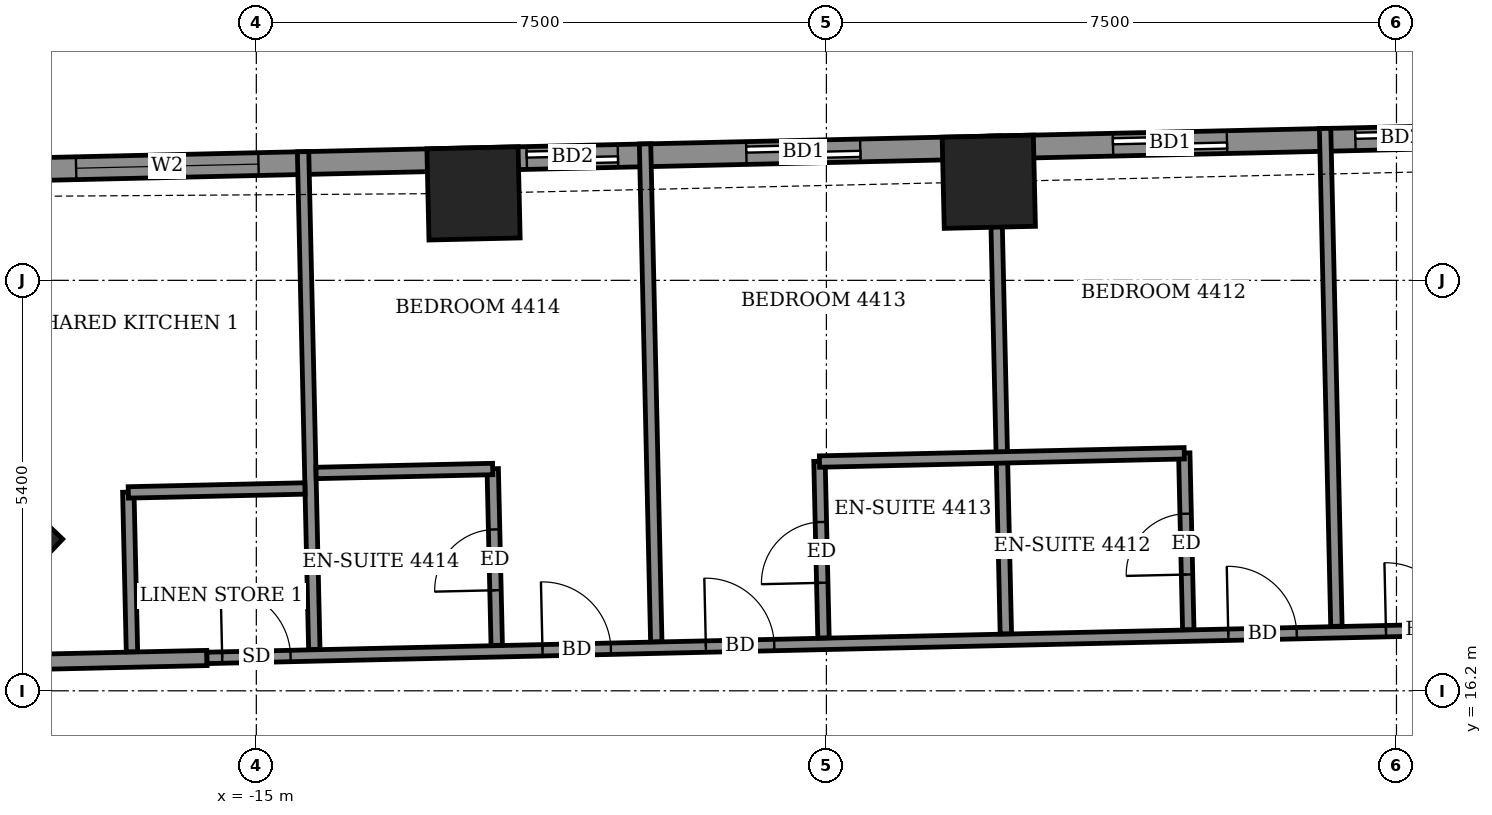
"""IFC4 building model, lengths in metres.
Left out: names, types, materials, properties, quantities, classifications, styles, units other than length and angle.
Written with IfcOpenShell. Run it as: python <this file> out.ifc"""

import sys

from ifc_helpers import new_model, si_unit, direction, frame, frame_2d, origin, origin_2d, place, context, subcontext, project, spatial, rectangle, extrude, element, fill, save


model = new_model("IFC4")
c1 = context("Model", 3, precision=1e-05, world=origin(), true_north=direction((0.0, 1.0)))
c2 = subcontext(c1, "Body", "Model", "MODEL_VIEW")
j1 = project(units=[si_unit("LENGTHUNIT", "METRE"), si_unit("PLANEANGLEUNIT", "RADIAN")], contexts=[c1])
p1 = place(None, origin())
s1 = spatial("IfcSite", under=j1, at=p1, CompositionType="ELEMENT")
p2 = place(p1, origin())
s2 = spatial("IfcBuilding", under=s1, at=p2, CompositionType="ELEMENT")
p3 = place(p2, frame((0.0, 0.0, 175.3)))
s3 = spatial("IfcBuildingStorey", under=s2, at=p3, CompositionType="ELEMENT", Elevation=175.3)
for number, where, z_axis, x_axis in (
    (1, (-5.364, 22.897, -0.55), (0.0, 0.0, 1.0), (-1.0, -0.023, 0.0)),
    (2, (-12.142, 22.744, -0.55), (0.0, 0.0, 1.0), (-1.0, -0.023, 0.0)),
    (3, (-18.396, 18.177, -0.55), (0.0, 0.0, 1.0), (-0.691, -0.723, 0.0)),
):
    element("IfcColumn", number, at=place(p3, frame(where, z_axis=z_axis, x_axis=x_axis)), inside=s3, PredefinedType="COLUMN", context=c2, shape_type="SweptSolid", body=[
        extrude(rectangle(XDim=1.2, YDim=1.2, at=origin_2d()), origin(), (0.0, 0.0, 1.0), 3.6),
    ])
p4 = place(p3, frame((21.589, 23.959, 0.0), z_axis=(0.0, 0.0, 1.0), x_axis=(-0.999742671382, -0.022684598702, 0.0)))
e4 = element("IfcWall", 4, at=p4, inside=s3, PredefinedType="SOLIDWALL", context=c2, shape_type="SweptSolid", body=[
    extrude(rectangle(XDim=40.381, YDim=0.3, at=frame_2d((20.19, 0.0))), origin(), (0.0, 0.0, 1.0), 3.05),
])
p5 = place(p4, frame((1.853, 0.0, 0.0)))
e5 = element("IfcOpeningElement", 5, at=p5, cuts=e4, PredefinedType="OPENING", context=c2, shape_type="SweptSolid", body=[
    extrude(rectangle(XDim=1.5, YDim=2.4, at=frame_2d((0.75, 1.2))), frame((0.0, 0.16, 0.0), z_axis=(0.0, -1.0, 0.0), x_axis=(1.0, 0.0, 0.0)), (0.0, 0.0, 1.0), 0.32),
])
p6 = place(p4, frame((7.38, 0.0, 0.0)))
e6 = element("IfcOpeningElement", 6, at=p6, cuts=e4, PredefinedType="OPENING", context=c2, shape_type="SweptSolid", body=[
    extrude(rectangle(XDim=1.2, YDim=2.4, at=frame_2d((0.6, 1.2))), frame((0.0, 0.16, 0.0), z_axis=(0.0, -1.0, 0.0), x_axis=(1.0, 0.0, 0.0)), (0.0, 0.0, 1.0), 0.32),
])
p7 = place(p4, frame((10.27, 0.0, 0.0)))
e7 = element("IfcOpeningElement", 7, at=p7, cuts=e4, PredefinedType="OPENING", context=c2, shape_type="SweptSolid", body=[
    extrude(rectangle(XDim=1.5, YDim=2.4, at=frame_2d((0.75, 1.2))), frame((0.0, 0.16, 0.0), z_axis=(0.0, -1.0, 0.0), x_axis=(1.0, 0.0, 0.0)), (0.0, 0.0, 1.0), 0.32),
])
p8 = place(p4, frame((15.095, 0.0, 0.0)))
e8 = element("IfcOpeningElement", 8, at=p8, cuts=e4, PredefinedType="OPENING", context=c2, shape_type="SweptSolid", body=[
    extrude(rectangle(XDim=1.5, YDim=2.4, at=frame_2d((0.75, 1.2))), frame((0.0, 0.16, 0.0), z_axis=(0.0, -1.0, 0.0), x_axis=(1.0, 0.0, 0.0)), (0.0, 0.0, 1.0), 0.32),
])
p9 = place(p4, frame((20.935, 0.0, 0.0)))
e9 = element("IfcOpeningElement", 9, at=p9, cuts=e4, PredefinedType="OPENING", context=c2, shape_type="SweptSolid", body=[
    extrude(rectangle(XDim=1.2, YDim=2.4, at=frame_2d((0.6, 1.2))), frame((0.0, 0.16, 0.0), z_axis=(0.0, -1.0, 0.0), x_axis=(1.0, 0.0, 0.0)), (0.0, 0.0, 1.0), 0.32),
])
p10 = place(p4, frame((23.825, 0.0, 0.0)))
e10 = element("IfcOpeningElement", 10, at=p10, cuts=e4, PredefinedType="OPENING", context=c2, shape_type="SweptSolid", body=[
    extrude(rectangle(XDim=1.5, YDim=2.4, at=frame_2d((0.75, 1.2))), frame((0.0, 0.16, 0.0), z_axis=(0.0, -1.0, 0.0), x_axis=(1.0, 0.0, 0.0)), (0.0, 0.0, 1.0), 0.32),
])
p11 = place(p4, frame((28.65, 0.0, 0.0)))
e11 = element("IfcOpeningElement", 11, at=p11, cuts=e4, PredefinedType="OPENING", context=c2, shape_type="SweptSolid", body=[
    extrude(rectangle(XDim=1.5, YDim=2.4, at=frame_2d((0.75, 1.2))), frame((0.0, 0.16, 0.0), z_axis=(0.0, -1.0, 0.0), x_axis=(1.0, 0.0, 0.0)), (0.0, 0.0, 1.0), 0.32),
])
p12 = place(p4, frame((31.84, 0.0, 0.0)))
e12 = element("IfcOpeningElement", 12, at=p12, cuts=e4, PredefinedType="OPENING", context=c2, shape_type="SweptSolid", body=[
    extrude(rectangle(XDim=1.2, YDim=2.4, at=frame_2d((0.6, 1.2))), frame((0.0, 0.16, 0.0), z_axis=(0.0, -1.0, 0.0), x_axis=(1.0, 0.0, 0.0)), (0.0, 0.0, 1.0), 0.32),
])
p13 = place(p4, frame((36.57, 0.0, 0.9)))
e13 = element("IfcOpeningElement", 13, at=p13, cuts=e4, PredefinedType="OPENING", context=c2, shape_type="SweptSolid", body=[
    extrude(rectangle(XDim=2.4, YDim=1.5, at=frame_2d((1.2, 0.75))), frame((0.0, 0.16, 0.0), z_axis=(0.0, -1.0, 0.0), x_axis=(1.0, 0.0, 0.0)), (0.0, 0.0, 1.0), 0.32),
])
p14 = place(p3, frame((-21.983, 16.489, 0.0), z_axis=(0.0, 0.0, 1.0), x_axis=(0.999744930163, 0.022584831499, 0.0)))
e14 = element("IfcWall", 14, at=p14, inside=s3, PredefinedType="PARTITIONING", context=c2, shape_type="SweptSolid", body=[
    extrude(rectangle(XDim=6.335, YDim=0.2, at=frame_2d((3.167, 0.0))), origin(), (0.0, 0.0, 1.0), 3.05),
])
p15 = place(p14, frame((1.475, 0.0, 0.0)))
e15 = element("IfcOpeningElement", 15, at=p15, cuts=e14, PredefinedType="OPENING", context=c2, shape_type="SweptSolid", body=[
    extrude(rectangle(XDim=1.0, YDim=2.1, at=frame_2d((0.5, 1.05))), frame((0.0, 0.11, 0.0), z_axis=(0.0, -1.0, 0.0), x_axis=(1.0, 0.0, 0.0)), (0.0, 0.0, 1.0), 0.22),
])
p16 = place(p3, frame((-15.649, 16.633, 0.0), z_axis=(0.0, 0.0, 1.0), x_axis=(0.999743261737, 0.022658565952, 0.0)))
e16 = element("IfcWall", 16, at=p16, inside=s3, PredefinedType="PARTITIONING", context=c2, shape_type="SweptSolid", body=[
    extrude(rectangle(XDim=30.536, YDim=0.15, at=frame_2d((15.268, 0.0))), origin(), (0.0, 0.0, 1.0), 3.05),
])
p17 = place(p16, frame((24.44, 0.0, 0.0)))
e17 = element("IfcOpeningElement", 17, at=p17, cuts=e16, PredefinedType="OPENING", context=c2, shape_type="SweptSolid", body=[
    extrude(rectangle(XDim=0.9, YDim=2.1, at=frame_2d((0.45, 1.05))), frame((0.0, 0.085, 0.0), z_axis=(0.0, -1.0, 0.0), x_axis=(1.0, 0.0, 0.0)), (0.0, 0.0, 1.0), 0.17),
])
p18 = place(p16, frame((22.365, 0.0, 0.0)))
e18 = element("IfcOpeningElement", 18, at=p18, cuts=e16, PredefinedType="OPENING", context=c2, shape_type="SweptSolid", body=[
    extrude(rectangle(XDim=0.9, YDim=2.1, at=frame_2d((0.45, 1.05))), frame((0.0, 0.085, 0.0), z_axis=(0.0, -1.0, 0.0), x_axis=(1.0, 0.0, 0.0)), (0.0, 0.0, 1.0), 0.17),
])
p19 = place(p16, frame((15.515, 0.0, 0.0)))
e19 = element("IfcOpeningElement", 19, at=p19, cuts=e16, PredefinedType="OPENING", context=c2, shape_type="SweptSolid", body=[
    extrude(rectangle(XDim=0.9, YDim=2.1, at=frame_2d((0.45, 1.05))), frame((0.0, 0.085, 0.0), z_axis=(0.0, -1.0, 0.0), x_axis=(1.0, 0.0, 0.0)), (0.0, 0.0, 1.0), 0.17),
])
p20 = place(p16, frame((13.44, 0.0, 0.0)))
e20 = element("IfcOpeningElement", 20, at=p20, cuts=e16, PredefinedType="OPENING", context=c2, shape_type="SweptSolid", body=[
    extrude(rectangle(XDim=0.9, YDim=2.1, at=frame_2d((0.45, 1.05))), frame((0.0, 0.085, 0.0), z_axis=(0.0, -1.0, 0.0), x_axis=(1.0, 0.0, 0.0)), (0.0, 0.0, 1.0), 0.17),
])
p21 = place(p16, frame((6.565, 0.0, 0.0)))
e21 = element("IfcOpeningElement", 21, at=p21, cuts=e16, PredefinedType="OPENING", context=c2, shape_type="SweptSolid", body=[
    extrude(rectangle(XDim=0.9, YDim=2.1, at=frame_2d((0.45, 1.05))), frame((0.0, 0.085, 0.0), z_axis=(0.0, -1.0, 0.0), x_axis=(1.0, 0.0, 0.0)), (0.0, 0.0, 1.0), 0.17),
])
p22 = place(p16, frame((4.415, 0.0, 0.0)))
e22 = element("IfcOpeningElement", 22, at=p22, cuts=e16, PredefinedType="OPENING", context=c2, shape_type="SweptSolid", body=[
    extrude(rectangle(XDim=0.9, YDim=2.1, at=frame_2d((0.45, 1.05))), frame((0.0, 0.085, 0.0), z_axis=(0.0, -1.0, 0.0), x_axis=(1.0, 0.0, 0.0)), (0.0, 0.0, 1.0), 0.17),
])
p23 = place(p16, frame((0.2, 0.0, 0.0)))
e23 = element("IfcOpeningElement", 23, at=p23, cuts=e16, PredefinedType="OPENING", context=c2, shape_type="SweptSolid", body=[
    extrude(rectangle(XDim=0.9, YDim=2.1, at=frame_2d((0.45, 1.05))), frame((0.0, 0.085, 0.0), z_axis=(0.0, -1.0, 0.0), x_axis=(1.0, 0.0, 0.0)), (0.0, 0.0, 1.0), 0.17),
])
p24 = place(p3, frame((-16.636, 16.714, 0.0), z_axis=(0.0, 0.0, 1.0), x_axis=(-0.022898307927, 0.999737799372, 0.0)))
e24 = element("IfcWall", 24, at=p24, inside=s3, PredefinedType="PARTITIONING", context=c2, shape_type="SweptSolid", body=[
    extrude(rectangle(XDim=2.1, YDim=0.15, at=frame_2d((1.05, 0.0))), origin(), (0.0, 0.0, 1.0), 3.05),
])
p25 = place(p3, frame((-14.237, 16.744, 0.0), z_axis=(0.0, 0.0, 1.0), x_axis=(-0.022585104341, 0.999744923999, 0.0)))
e25 = element("IfcWall", 25, at=p25, inside=s3, PredefinedType="PARTITIONING", context=c2, shape_type="SweptSolid", body=[
    extrude(rectangle(XDim=6.551, YDim=0.15, at=frame_2d((3.275, 0.0))), origin(), (0.0, 0.0, 1.0), 2.55),
])
p26 = place(p3, frame((-11.837, 16.798, 0.0), z_axis=(0.0, 0.0, 1.0), x_axis=(-0.02279059109, 0.999740260747, 0.0)))
e26 = element("IfcWall", 26, at=p26, inside=s3, PredefinedType="PARTITIONING", context=c2, shape_type="SweptSolid", body=[
    extrude(rectangle(XDim=2.324, YDim=0.15, at=frame_2d((1.162, 0.0))), origin(), (0.0, 0.0, 1.0), 3.05),
])
p27 = place(p26, frame((0.725, 0.0, 0.0)))
e27 = element("IfcOpeningElement", 27, at=p27, cuts=e26, PredefinedType="OPENING", context=c2, shape_type="SweptSolid", body=[
    extrude(rectangle(XDim=0.8, YDim=2.1, at=frame_2d((0.4, 1.05))), frame((0.0, 0.085, 0.0), z_axis=(0.0, -1.0, 0.0), x_axis=(1.0, 0.0, 0.0)), (0.0, 0.0, 1.0), 0.17),
])
p28 = place(p3, frame((-9.738, 16.846, 0.0), z_axis=(0.0, 0.0, 1.0), x_axis=(-0.022585104341, 0.999744923999, 0.0)))
e28 = element("IfcWall", 28, at=p28, inside=s3, PredefinedType="PARTITIONING", context=c2, shape_type="SweptSolid", body=[
    extrude(rectangle(XDim=6.551, YDim=0.15, at=frame_2d((3.275, 0.0))), origin(), (0.0, 0.0, 1.0), 2.55),
])
p29 = place(p3, frame((-7.538, 16.896, 0.0), z_axis=(0.0, 0.0, 1.0), x_axis=(-0.02279059109, 0.999740260747, 0.0)))
e29 = element("IfcWall", 29, at=p29, inside=s3, PredefinedType="PARTITIONING", context=c2, shape_type="SweptSolid", body=[
    extrude(rectangle(XDim=2.324, YDim=0.15, at=frame_2d((1.162, 0.0))), origin(), (0.0, 0.0, 1.0), 3.05),
])
p30 = place(p29, frame((0.725, 0.0, 0.0)))
e30 = element("IfcOpeningElement", 30, at=p30, cuts=e29, PredefinedType="OPENING", context=c2, shape_type="SweptSolid", body=[
    extrude(rectangle(XDim=0.8, YDim=2.1, at=frame_2d((0.4, 1.05))), frame((0.0, 0.085, 0.0), z_axis=(0.0, -1.0, 0.0), x_axis=(1.0, 0.0, 0.0)), (0.0, 0.0, 1.0), 0.17),
])
p31 = place(p3, frame((-5.139, 16.95, 0.0), z_axis=(0.0, 0.0, 1.0), x_axis=(-0.022622354432, 0.999744081793, 0.0)))
e31 = element("IfcWall", 31, at=p31, inside=s3, PredefinedType="PARTITIONING", context=c2, shape_type="SweptSolid", body=[
    extrude(rectangle(XDim=6.551, YDim=0.15, at=frame_2d((3.275, 0.0))), origin(), (0.0, 0.0, 1.0), 3.05),
])
p32 = place(p3, frame((-2.739, 17.005, 0.0), z_axis=(0.0, 0.0, 1.0), x_axis=(-0.022788198363, 0.99974031529, 0.0)))
e32 = element("IfcWall", 32, at=p32, inside=s3, PredefinedType="PARTITIONING", context=c2, shape_type="SweptSolid", body=[
    extrude(rectangle(XDim=2.325, YDim=0.15, at=frame_2d((1.162, 0.0))), origin(), (0.0, 0.0, 1.0), 3.05),
])
p33 = place(p32, frame((0.725, 0.0, 0.0)))
e33 = element("IfcOpeningElement", 33, at=p33, cuts=e32, PredefinedType="OPENING", context=c2, shape_type="SweptSolid", body=[
    extrude(rectangle(XDim=0.8, YDim=2.1, at=frame_2d((0.4, 1.05))), frame((0.0, 0.085, 0.0), z_axis=(0.0, -1.0, 0.0), x_axis=(1.0, 0.0, 0.0)), (0.0, 0.0, 1.0), 0.17),
])
p34 = place(p3, frame((-0.79, 17.049, 0.0), z_axis=(0.0, 0.0, 1.0), x_axis=(-0.022734951231, 0.999741527592, 0.0)))
e34 = element("IfcWall", 34, at=p34, inside=s3, PredefinedType="PARTITIONING", context=c2, shape_type="SweptSolid", body=[
    extrude(rectangle(XDim=6.551, YDim=0.15, at=frame_2d((3.275, 0.0))), origin(), (0.0, 0.0, 1.0), 2.55),
])
p35 = place(p3, frame((-16.684, 18.81, 0.0), z_axis=(0.0, 0.0, 1.0), x_axis=(0.999749744571, 0.022370700241, 0.0)))
e35 = element("IfcWall", 35, at=p35, inside=s3, PredefinedType="PARTITIONING", context=c2, shape_type="SweptSolid", body=[
    extrude(rectangle(XDim=2.324, YDim=0.15, at=frame_2d((1.162, 0.0))), origin(), (0.0, 0.0, 1.0), 3.05),
])
p36 = place(p3, frame((-14.214, 19.066, 0.0), z_axis=(0.0, 0.0, 1.0), x_axis=(0.999749797124, 0.022368351553, 0.0)))
e36 = element("IfcWall", 36, at=p36, inside=s3, PredefinedType="PARTITIONING", context=c2, shape_type="SweptSolid", body=[
    extrude(rectangle(XDim=2.325, YDim=0.15, at=frame_2d((1.162, 0.0))), origin(), (0.0, 0.0, 1.0), 3.05),
])
p37 = place(p3, frame((-7.591, 19.216, 0.0), z_axis=(0.0, 0.0, 1.0), x_axis=(0.999742701292, 0.022683280499, 0.0)))
e37 = element("IfcWall", 37, at=p37, inside=s3, PredefinedType="PARTITIONING", context=c2, shape_type="SweptSolid", body=[
    extrude(rectangle(XDim=4.8, YDim=0.15, at=frame_2d((2.4, 0.0))), origin(), (0.0, 0.0, 1.0), 3.05),
])
p38 = place(p9, origin())
e38 = element("IfcDoor", 38, at=p38, inside=s3, OperationType="SLIDING_TO_LEFT", PredefinedType="DOOR", context=c2, shape_type="SweptSolid", body=[
    extrude(rectangle(XDim=1.2, YDim=2.4, at=frame_2d((0.6, 1.2))), frame((0.0, 0.025, 0.0), z_axis=(0.0, -1.0, 0.0), x_axis=(1.0, 0.0, 0.0)), (0.0, 0.0, 1.0), 0.05),
])
fill(e9, e38)
p39 = place(p10, origin())
e39 = element("IfcDoor", 39, at=p39, inside=s3, OperationType="SLIDING_TO_LEFT", PredefinedType="DOOR", context=c2, shape_type="SweptSolid", body=[
    extrude(rectangle(XDim=1.5, YDim=2.4, at=frame_2d((0.75, 1.2))), frame((0.0, 0.025, 0.0), z_axis=(0.0, -1.0, 0.0), x_axis=(1.0, 0.0, 0.0)), (0.0, 0.0, 1.0), 0.05),
])
fill(e10, e39)
p40 = place(p11, origin())
e40 = element("IfcDoor", 40, at=p40, inside=s3, OperationType="SLIDING_TO_LEFT", PredefinedType="DOOR", context=c2, shape_type="SweptSolid", body=[
    extrude(rectangle(XDim=1.5, YDim=2.4, at=frame_2d((0.75, 1.2))), frame((0.0, 0.025, 0.0), z_axis=(0.0, -1.0, 0.0), x_axis=(1.0, 0.0, 0.0)), (0.0, 0.0, 1.0), 0.05),
])
fill(e11, e40)
p41 = place(p12, origin())
e41 = element("IfcDoor", 41, at=p41, inside=s3, OperationType="SLIDING_TO_LEFT", PredefinedType="DOOR", context=c2, shape_type="SweptSolid", body=[
    extrude(rectangle(XDim=1.2, YDim=2.4, at=frame_2d((0.6, 1.2))), frame((0.0, 0.025, 0.0), z_axis=(0.0, -1.0, 0.0), x_axis=(1.0, 0.0, 0.0)), (0.0, 0.0, 1.0), 0.05),
])
fill(e12, e41)
p42 = place(p13, origin())
e42 = element("IfcWindow", 42, at=p42, inside=s3, PartitioningType="DOUBLE_PANEL_VERTICAL", PredefinedType="WINDOW", context=c2, shape_type="SweptSolid", body=[
    extrude(rectangle(XDim=2.4, YDim=1.5, at=frame_2d((1.2, 0.75))), frame((0.0, 0.03, 0.0), z_axis=(0.0, -1.0, 0.0), x_axis=(1.0, 0.0, 0.0)), (0.0, 0.0, 1.0), 0.06),
])
fill(e13, e42)
p43 = place(p19, origin())
e43 = element("IfcDoor", 43, at=p43, inside=s3, OperationType="SINGLE_SWING_LEFT", PredefinedType="DOOR", context=c2, shape_type="SweptSolid", body=[
    extrude(rectangle(XDim=0.9, YDim=2.1, at=frame_2d((0.45, 1.05))), frame((0.0, 0.025, 0.0), z_axis=(0.0, -1.0, 0.0), x_axis=(1.0, 0.0, 0.0)), (0.0, 0.0, 1.0), 0.05),
])
fill(e19, e43)
p44 = place(p20, origin())
e44 = element("IfcDoor", 44, at=p44, inside=s3, OperationType="SINGLE_SWING_RIGHT", PredefinedType="DOOR", context=c2, shape_type="SweptSolid", body=[
    extrude(rectangle(XDim=0.9, YDim=2.1, at=frame_2d((0.45, 1.05))), frame((0.0, 0.025, 0.0), z_axis=(0.0, -1.0, 0.0), x_axis=(1.0, 0.0, 0.0)), (0.0, 0.0, 1.0), 0.05),
])
fill(e20, e44)
p45 = place(p33, origin())
e45 = element("IfcDoor", 45, at=p45, inside=s3, OperationType="SINGLE_SWING_RIGHT", PredefinedType="DOOR", context=c2, shape_type="SweptSolid", body=[
    extrude(rectangle(XDim=0.8, YDim=2.1, at=frame_2d((0.4, 1.05))), frame((0.0, 0.025, 0.0), z_axis=(0.0, -1.0, 0.0), x_axis=(1.0, 0.0, 0.0)), (0.0, 0.0, 1.0), 0.05),
])
fill(e33, e45)
p46 = place(p21, origin())
e46 = element("IfcDoor", 46, at=p46, inside=s3, OperationType="SINGLE_SWING_LEFT", PredefinedType="DOOR", context=c2, shape_type="SweptSolid", body=[
    extrude(rectangle(XDim=0.9, YDim=2.1, at=frame_2d((0.45, 1.05))), frame((0.0, 0.025, 0.0), z_axis=(0.0, -1.0, 0.0), x_axis=(1.0, 0.0, 0.0)), (0.0, 0.0, 1.0), 0.05),
])
fill(e21, e46)
p47 = place(p30, origin())
e47 = element("IfcDoor", 47, at=p47, inside=s3, OperationType="SINGLE_SWING_LEFT", PredefinedType="DOOR", context=c2, shape_type="SweptSolid", body=[
    extrude(rectangle(XDim=0.8, YDim=2.1, at=frame_2d((0.4, 1.05))), frame((0.0, 0.025, 0.0), z_axis=(0.0, -1.0, 0.0), x_axis=(1.0, 0.0, 0.0)), (0.0, 0.0, 1.0), 0.05),
])
fill(e30, e47)
p48 = place(p22, origin())
e48 = element("IfcDoor", 48, at=p48, inside=s3, OperationType="SINGLE_SWING_RIGHT", PredefinedType="DOOR", context=c2, shape_type="SweptSolid", body=[
    extrude(rectangle(XDim=0.9, YDim=2.1, at=frame_2d((0.45, 1.05))), frame((0.0, 0.025, 0.0), z_axis=(0.0, -1.0, 0.0), x_axis=(1.0, 0.0, 0.0)), (0.0, 0.0, 1.0), 0.05),
])
fill(e22, e48)
p49 = place(p27, origin())
e49 = element("IfcDoor", 49, at=p49, inside=s3, OperationType="SINGLE_SWING_RIGHT", PredefinedType="DOOR", context=c2, shape_type="SweptSolid", body=[
    extrude(rectangle(XDim=0.8, YDim=2.1, at=frame_2d((0.4, 1.05))), frame((0.0, 0.025, 0.0), z_axis=(0.0, -1.0, 0.0), x_axis=(1.0, 0.0, 0.0)), (0.0, 0.0, 1.0), 0.05),
])
fill(e27, e49)
p50 = place(p23, origin())
e50 = element("IfcDoor", 50, at=p50, inside=s3, OperationType="SINGLE_SWING_RIGHT", PredefinedType="DOOR", context=c2, shape_type="SweptSolid", body=[
    extrude(rectangle(XDim=0.9, YDim=2.1, at=frame_2d((0.45, 1.05))), frame((0.0, 0.025, 0.0), z_axis=(0.0, -1.0, 0.0), x_axis=(1.0, 0.0, 0.0)), (0.0, 0.0, 1.0), 0.05),
])
fill(e23, e50)
save(model, sys.argv[1])
